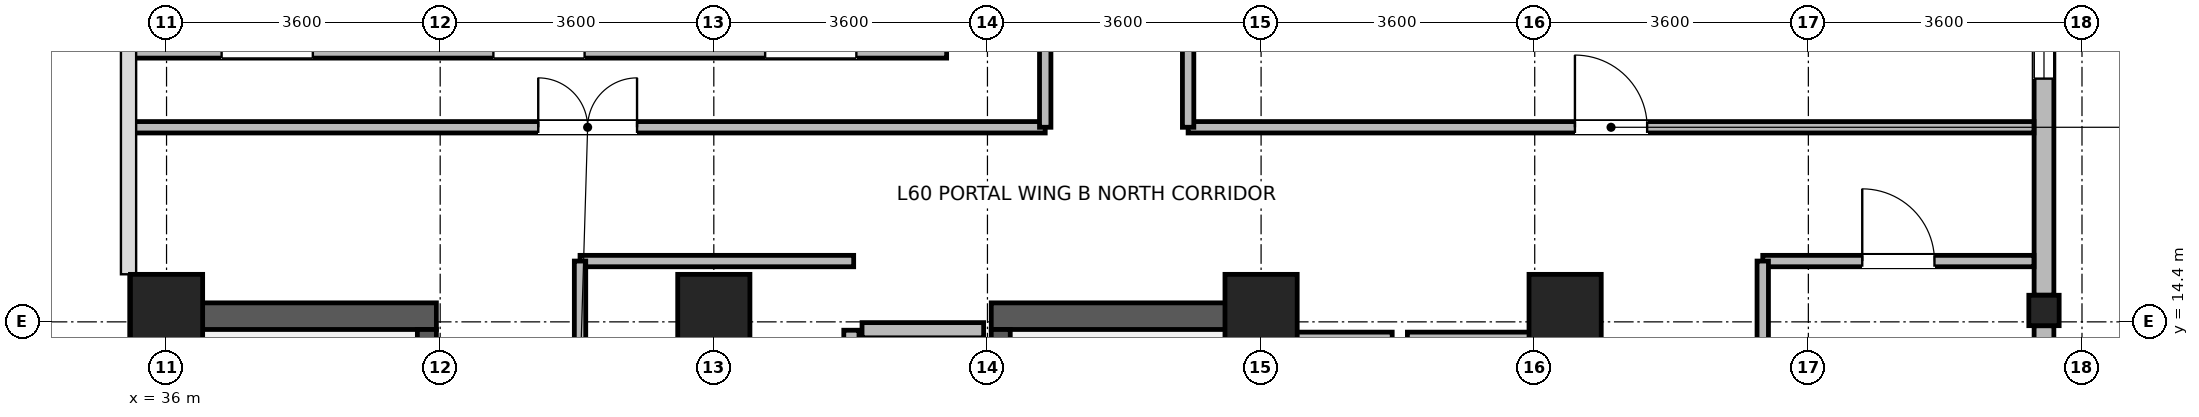
"""IFC4 building model, lengths in metres.
Left out: names, types, materials, properties, quantities, classifications, styles, units other than length and angle.
Written with IfcOpenShell. Run it as: python <this file> out.ifc"""

import sys

from ifc_helpers import new_model, si_unit, direction, frame, frame_2d, origin, origin_2d, place, context, subcontext, project, spatial, rectangle, i_section, extrude, source, transform, mapped, element, fill, save


model = new_model("IFC4")
c1 = context("Model", 3, precision=1e-05, world=origin(), true_north=direction((0.0, 1.0)))
c2 = subcontext(c1, "Body", "Model", "MODEL_VIEW")
j1 = project(units=[si_unit("LENGTHUNIT", "METRE"), si_unit("PLANEANGLEUNIT", "RADIAN")], contexts=[c1])
p1 = place(None, origin())
s1 = spatial("IfcSite", under=j1, at=p1, CompositionType="ELEMENT")
p2 = place(p1, origin())
s2 = spatial("IfcBuilding", under=s1, at=p2, CompositionType="ELEMENT")
p3 = place(p2, frame((0.0, 0.0, 235.1)))
s3 = spatial("IfcBuildingStorey", under=s2, at=p3, CompositionType="ELEMENT", Elevation=235.1)
for number, where, z_axis, x_axis in (
    (1, (36.175, 6.95, 0.0), (0.0, 0.0, 1.0), (0.0, 1.0, 0.0)),
    (2, (50.225, 6.95, 0.0), (0.0, 0.0, 1.0), (0.0, 1.0, 0.0)),
):
    element("IfcWall", number, at=place(p3, frame(where, z_axis=z_axis, x_axis=x_axis)), inside=s3, PredefinedType="SHEAR", context=c2, shape_type="SweptSolid", body=[
        extrude(rectangle(XDim=7.7, YDim=0.35, at=frame_2d((3.85, 0.0))), origin(), (0.0, 0.0, 1.0), 3.44),
    ])
for number, where, z_axis, x_axis in (
    (3, (36.35, 14.475, 0.0), (0.0, 0.0, 1.0), (1.0, 0.0, 0.0)),
    (4, (46.85, 14.475, 0.0), (0.0, 0.0, 1.0), (1.0, 0.0, 0.0)),
):
    element("IfcWall", number, at=place(p3, frame(where, z_axis=z_axis, x_axis=x_axis)), inside=s3, PredefinedType="SHEAR", context=c2, shape_type="SweptSolid", body=[
        extrude(rectangle(XDim=3.2, YDim=0.35, at=frame_2d((1.6, 0.0))), origin(), (0.0, 0.0, 1.0), 3.44),
    ])
p4 = place(p3, frame((39.425, 7.3, 0.0), z_axis=(0.0, 0.0, 1.0), x_axis=(0.0, 1.0, 0.0)))
e5 = element("IfcWall", 5, at=p4, inside=s3, PredefinedType="SHEAR", context=c2, shape_type="SweptSolid", body=[
    extrude(rectangle(XDim=7.0, YDim=0.25, at=frame_2d((3.5, 0.0))), origin(), (0.0, 0.0, 1.0), 3.44),
])
p5 = place(p4, frame((0.15, 0.0, 0.0)))
e6 = element("IfcOpeningElement", 6, at=p5, cuts=e5, PredefinedType="OPENING", context=c2, shape_type="SweptSolid", body=[
    extrude(rectangle(XDim=1.1, YDim=2.08, at=frame_2d((0.55, 1.04))), frame((0.0, 0.135, 0.0), z_axis=(0.0, -1.0, 0.0), x_axis=(1.0, 0.0, 0.0)), (0.0, 0.0, 1.0), 0.27),
])
p6 = place(p3, frame((46.975, 7.3, 0.0), z_axis=(0.0, 0.0, 1.0), x_axis=(0.0, 1.0, 0.0)))
e7 = element("IfcWall", 7, at=p6, inside=s3, PredefinedType="SHEAR", context=c2, shape_type="SweptSolid", body=[
    extrude(rectangle(XDim=7.0, YDim=0.25, at=frame_2d((3.5, 0.0))), origin(), (0.0, 0.0, 1.0), 3.44),
])
p7 = place(p6, frame((0.15, 0.0, 0.0)))
e8 = element("IfcOpeningElement", 8, at=p7, cuts=e7, PredefinedType="OPENING", context=c2, shape_type="SweptSolid", body=[
    extrude(rectangle(XDim=1.1, YDim=2.08, at=frame_2d((0.55, 1.04))), frame((0.0, 0.135, 0.0), z_axis=(0.0, -1.0, 0.0), x_axis=(1.0, 0.0, 0.0)), (0.0, 0.0, 1.0), 0.27),
])
m1 = source(origin(), c2, "Body", "SweptSolid", [
    extrude(rectangle(XDim=0.95, YDim=0.95, at=origin_2d()), origin(), (0.0, 0.0, 1.0), 3.7),
])
for number, where, z_axis, x_axis in (
    (9, (36.0, 14.55, 0.0), (0.0, 0.0, 1.0), (1.0, 0.0, 0.0)),
    (10, (43.2, 14.55, 0.0), (0.0, 0.0, 1.0), (1.0, 0.0, 0.0)),
    (11, (50.4, 14.55, 0.0), (0.0, 0.0, 1.0), (1.0, 0.0, 0.0)),
    (12, (54.4, 14.55, 0.0), (0.0, 0.0, 1.0), (1.0, 0.0, 0.0)),
):
    element("IfcColumn", number, at=place(p3, frame(where, z_axis=z_axis, x_axis=x_axis)), inside=s3, PredefinedType="COLUMN", context=c2, shape_type="MappedRepresentation", body=[
        mapped(m1, transform((0.0, 0.0, 0.0), x_axis=(1.0, 0.0, 0.0), y_axis=(0.0, 1.0, 0.0), z_axis=(0.0, 0.0, 1.0), scale=1.0)),
    ])
m2 = source(origin(), c2, "Body", "SweptSolid", [
    extrude(i_section(OverallWidth=0.399, OverallDepth=0.4, WebThickness=0.017, FlangeThickness=0.023, FilletRadius=0.015, at=origin_2d()), origin(), (0.0, 0.0, 1.0), 3.7),
])
p8 = place(p3, frame((60.7, 14.55, 0.0), z_axis=(0.0, 0.0, 1.0), x_axis=(1.0, 0.0, 0.0)))
e13 = element("IfcColumn", 13, at=p8, inside=s3, PredefinedType="COLUMN", context=c2, shape_type="MappedRepresentation", body=[
    mapped(m2, transform((0.0, 0.0, 0.0), x_axis=(1.0, 0.0, 0.0), y_axis=(0.0, 1.0, 0.0), z_axis=(0.0, 0.0, 1.0), scale=1.0)),
])
p9 = place(p3, frame((60.7, 14.349, 0.0), z_axis=(0.0, 0.0, 1.0), x_axis=(0.0, -1.0, 0.0)))
e14 = element("IfcWall", 14, at=p9, inside=s3, PredefinedType="STANDARD", context=c2, shape_type="SweptSolid", body=[
    extrude(rectangle(XDim=7.098, YDim=0.26, at=frame_2d((3.549, 0.0))), origin(), (0.0, 0.0, 1.0), 3.02),
])
p10 = place(p9, frame((1.175, 0.0, 0.85)))
e15 = element("IfcOpeningElement", 15, at=p10, cuts=e14, PredefinedType="OPENING", context=c2, shape_type="SweptSolid", body=[
    extrude(rectangle(XDim=1.2, YDim=1.75, at=frame_2d((0.6, 0.875))), frame((0.0, 0.14, 0.0), z_axis=(0.0, -1.0, 0.0), x_axis=(1.0, 0.0, 0.0)), (0.0, 0.0, 1.0), 0.28),
])
p11 = place(p9, frame((3.074, 0.0, 0.85)))
e16 = element("IfcOpeningElement", 16, at=p11, cuts=e14, PredefinedType="OPENING", context=c2, shape_type="SweptSolid", body=[
    extrude(rectangle(XDim=0.95, YDim=1.75, at=frame_2d((0.475, 0.875))), frame((0.0, 0.14, 0.0), z_axis=(0.0, -1.0, 0.0), x_axis=(1.0, 0.0, 0.0)), (0.0, 0.0, 1.0), 0.28),
])
p12 = place(p3, frame((60.7, 21.399, 0.0), z_axis=(0.0, 0.0, 1.0), x_axis=(0.0, -1.0, 0.0)))
e17 = element("IfcWall", 17, at=p12, inside=s3, PredefinedType="STANDARD", context=c2, shape_type="SweptSolid", body=[
    extrude(rectangle(XDim=6.648, YDim=0.26, at=frame_2d((3.324, 0.0))), origin(), (0.0, 0.0, 1.0), 3.02),
])
p13 = place(p12, frame((1.062, 0.0, 0.85)))
e18 = element("IfcOpeningElement", 18, at=p13, cuts=e17, PredefinedType="OPENING", context=c2, shape_type="SweptSolid", body=[
    extrude(rectangle(XDim=1.2, YDim=1.75, at=frame_2d((0.6, 0.875))), frame((0.0, 0.14, 0.0), z_axis=(0.0, -1.0, 0.0), x_axis=(1.0, 0.0, 0.0)), (0.0, 0.0, 1.0), 0.28),
])
p14 = place(p12, frame((2.849, 0.0, 0.85)))
e19 = element("IfcOpeningElement", 19, at=p14, cuts=e17, PredefinedType="OPENING", context=c2, shape_type="SweptSolid", body=[
    extrude(rectangle(XDim=0.95, YDim=1.75, at=frame_2d((0.475, 0.875))), frame((0.0, 0.14, 0.0), z_axis=(0.0, -1.0, 0.0), x_axis=(1.0, 0.0, 0.0)), (0.0, 0.0, 1.0), 0.28),
])
p15 = place(p3, frame((35.537, 18.0, 0.0), z_axis=(0.0, 0.0, 1.0), x_axis=(1.0, 0.0, 0.0)))
e20 = element("IfcWall", 20, at=p15, inside=s3, PredefinedType="STANDARD", context=c2, shape_type="SweptSolid", body=[
    extrude(rectangle(XDim=10.726, YDim=0.26, at=frame_2d((5.363, 0.0))), origin(), (0.0, 0.0, 1.0), 3.42),
])
p16 = place(p15, frame((1.188, 0.0, 0.85)))
e21 = element("IfcOpeningElement", 21, at=p16, cuts=e20, PredefinedType="OPENING", context=c2, shape_type="SweptSolid", body=[
    extrude(rectangle(XDim=1.2, YDim=1.75, at=frame_2d((0.6, 0.875))), frame((0.0, 0.14, 0.0), z_axis=(0.0, -1.0, 0.0), x_axis=(1.0, 0.0, 0.0)), (0.0, 0.0, 1.0), 0.28),
])
p17 = place(p15, frame((4.763, 0.0, 0.85)))
e22 = element("IfcOpeningElement", 22, at=p17, cuts=e20, PredefinedType="OPENING", context=c2, shape_type="SweptSolid", body=[
    extrude(rectangle(XDim=1.2, YDim=1.75, at=frame_2d((0.6, 0.875))), frame((0.0, 0.14, 0.0), z_axis=(0.0, -1.0, 0.0), x_axis=(1.0, 0.0, 0.0)), (0.0, 0.0, 1.0), 0.28),
])
p18 = place(p15, frame((8.338, 0.0, 0.85)))
e23 = element("IfcOpeningElement", 23, at=p18, cuts=e20, PredefinedType="OPENING", context=c2, shape_type="SweptSolid", body=[
    extrude(rectangle(XDim=1.2, YDim=1.75, at=frame_2d((0.6, 0.875))), frame((0.0, 0.14, 0.0), z_axis=(0.0, -1.0, 0.0), x_axis=(1.0, 0.0, 0.0)), (0.0, 0.0, 1.0), 0.28),
])
p19 = place(p3, frame((50.475, 14.165, 0.0), z_axis=(0.0, 0.0, 1.0), x_axis=(1.0, 0.0, 0.0)))
e24 = element("IfcWall", 24, at=p19, inside=s3, PredefinedType="PARTITIONING", context=c2, shape_type="SweptSolid", body=[
    extrude(rectangle(XDim=1.65, YDim=0.2, at=frame_2d((0.825, 0.0))), origin(), (0.0, 0.0, 1.0), 3.42),
])
p20 = place(p3, frame((52.325, 14.165, 0.0), z_axis=(0.0, 0.0, 1.0), x_axis=(1.0, 0.0, 0.0)))
e25 = element("IfcWall", 25, at=p20, inside=s3, PredefinedType="PARTITIONING", context=c2, shape_type="SweptSolid", body=[
    extrude(rectangle(XDim=1.65, YDim=0.2, at=frame_2d((0.825, 0.0))), origin(), (0.0, 0.0, 1.0), 3.42),
])
p21 = place(p3, frame((45.15, 14.29, 0.0), z_axis=(0.0, 0.0, 1.0), x_axis=(1.0, 0.0, 0.0)))
e26 = element("IfcWall", 26, at=p21, inside=s3, PredefinedType="PARTITIONING", context=c2, shape_type="SweptSolid", body=[
    extrude(rectangle(XDim=1.6, YDim=0.2, at=frame_2d((0.8, 0.0))), origin(), (0.0, 0.0, 1.0), 2.52),
])
p22 = place(p3, frame((45.01, 11.61, 0.0), z_axis=(0.0, 0.0, 1.0), x_axis=(0.0, 1.0, 0.0)))
e27 = element("IfcWall", 27, at=p22, inside=s3, PredefinedType="PARTITIONING", context=c2, shape_type="SweptSolid", body=[
    extrude(rectangle(XDim=2.68, YDim=0.2, at=frame_2d((1.34, 0.0))), origin(), (0.0, 0.0, 1.0), 3.42),
])
p23 = place(p3, frame((35.52, 16.96, 0.0), z_axis=(0.0, 0.0, 1.0), x_axis=(1.0, 0.0, 0.0)))
e28 = element("IfcWall", 28, at=p23, inside=s3, PredefinedType="PARTITIONING", context=c2, shape_type="SweptSolid", body=[
    extrude(rectangle(XDim=12.04, YDim=0.15, at=frame_2d((6.02, 0.0))), origin(), (0.0, 0.0, 1.0), 3.42),
])
p24 = place(p23, frame((5.37, 0.0, 0.0)))
e29 = element("IfcOpeningElement", 29, at=p24, cuts=e28, PredefinedType="OPENING", context=c2, shape_type="SweptSolid", body=[
    extrude(rectangle(XDim=1.3, YDim=2.12, at=frame_2d((0.65, 1.06))), frame((0.0, 0.085, 0.0), z_axis=(0.0, -1.0, 0.0), x_axis=(1.0, 0.0, 0.0)), (0.0, 0.0, 1.0), 0.17),
])
p25 = place(p3, frame((49.44, 16.96, 0.0), z_axis=(0.0, 0.0, 1.0), x_axis=(1.0, 0.0, 0.0)))
e30 = element("IfcWall", 30, at=p25, inside=s3, PredefinedType="PARTITIONING", context=c2, shape_type="SweptSolid", body=[
    extrude(rectangle(XDim=11.128, YDim=0.15, at=frame_2d((5.564, 0.0))), origin(), (0.0, 0.0, 1.0), 3.42),
])
p26 = place(p25, frame((5.089, 0.0, 0.0)))
e31 = element("IfcOpeningElement", 31, at=p26, cuts=e30, PredefinedType="OPENING", context=c2, shape_type="SweptSolid", body=[
    extrude(rectangle(XDim=0.95, YDim=2.1, at=frame_2d((0.475, 1.05))), frame((0.0, 0.085, 0.0), z_axis=(0.0, -1.0, 0.0), x_axis=(1.0, 0.0, 0.0)), (0.0, 0.0, 1.0), 0.17),
])
p27 = place(p3, frame((49.44, 16.96, 0.0), z_axis=(0.0, 0.0, 1.0), x_axis=(0.0, 1.0, 0.0)))
e32 = element("IfcWall", 32, at=p27, inside=s3, PredefinedType="PARTITIONING", context=c2, shape_type="SweptSolid", body=[
    extrude(rectangle(XDim=5.24, YDim=0.15, at=frame_2d((2.62, 0.0))), origin(), (0.0, 0.0, 1.0), 3.42),
])
p28 = place(p3, frame((47.56, 16.96, 0.0), z_axis=(0.0, 0.0, 1.0), x_axis=(0.0, 1.0, 0.0)))
e33 = element("IfcWall", 33, at=p28, inside=s3, PredefinedType="PARTITIONING", context=c2, shape_type="SweptSolid", body=[
    extrude(rectangle(XDim=4.44, YDim=0.15, at=frame_2d((2.22, 0.0))), origin(), (0.0, 0.0, 1.0), 3.42),
])
p29 = place(p3, frame((57.0, 15.2, 0.0), z_axis=(0.0, 0.0, 1.0), x_axis=(1.0, 0.0, 0.0)))
e34 = element("IfcWall", 34, at=p29, inside=s3, PredefinedType="PARTITIONING", context=c2, shape_type="SweptSolid", body=[
    extrude(rectangle(XDim=3.568, YDim=0.15, at=frame_2d((1.784, 0.0))), origin(), (0.0, 0.0, 1.0), 3.42),
])
p30 = place(p29, frame((1.309, 0.0, 0.0)))
e35 = element("IfcOpeningElement", 35, at=p30, cuts=e34, PredefinedType="OPENING", context=c2, shape_type="SweptSolid", body=[
    extrude(rectangle(XDim=0.95, YDim=2.1, at=frame_2d((0.475, 1.05))), frame((0.0, 0.085, 0.0), z_axis=(0.0, -1.0, 0.0), x_axis=(1.0, 0.0, 0.0)), (0.0, 0.0, 1.0), 0.17),
])
p31 = place(p3, frame((41.44, 15.2, 0.0), z_axis=(0.0, 0.0, 1.0), x_axis=(1.0, 0.0, 0.0)))
e36 = element("IfcWall", 36, at=p31, inside=s3, PredefinedType="PARTITIONING", context=c2, shape_type="SweptSolid", body=[
    extrude(rectangle(XDim=3.6, YDim=0.15, at=frame_2d((1.8, 0.0))), origin(), (0.0, 0.0, 1.0), 3.42),
])
p32 = place(p3, frame((41.44, 11.64, 0.0), z_axis=(0.0, 0.0, 1.0), x_axis=(0.0, 1.0, 0.0)))
e37 = element("IfcWall", 37, at=p32, inside=s3, PredefinedType="PARTITIONING", context=c2, shape_type="SweptSolid", body=[
    extrude(rectangle(XDim=3.56, YDim=0.15, at=frame_2d((1.78, 0.0))), origin(), (0.0, 0.0, 1.0), 3.42),
])
p33 = place(p3, frame((57.0, 11.96, 0.0), z_axis=(0.0, 0.0, 1.0), x_axis=(0.0, 1.0, 0.0)))
e38 = element("IfcWall", 38, at=p33, inside=s3, PredefinedType="PARTITIONING", context=c2, shape_type="SweptSolid", body=[
    extrude(rectangle(XDim=3.24, YDim=0.15, at=frame_2d((1.62, 0.0))), origin(), (0.0, 0.0, 1.0), 3.42),
])
p34 = place(p14, origin())
e39 = element("IfcWindow", 39, at=p34, inside=s3, PartitioningType="SINGLE_PANEL", PredefinedType="WINDOW", context=c2, shape_type="SweptSolid", body=[
    extrude(rectangle(XDim=0.95, YDim=1.75, at=frame_2d((0.475, 0.875))), frame((0.0, 0.03, 0.0), z_axis=(0.0, -1.0, 0.0), x_axis=(1.0, 0.0, 0.0)), (0.0, 0.0, 1.0), 0.06),
])
fill(e19, e39)
p35 = place(p24, origin())
e40 = element("IfcDoor", 40, at=p35, inside=s3, OperationType="DOUBLE_DOOR_SINGLE_SWING", PredefinedType="DOOR", context=c2, shape_type="SweptSolid", body=[
    extrude(rectangle(XDim=1.3, YDim=2.12, at=frame_2d((0.65, 1.06))), frame((0.0, 0.025, 0.0), z_axis=(0.0, -1.0, 0.0), x_axis=(1.0, 0.0, 0.0)), (0.0, 0.0, 1.0), 0.05),
])
fill(e29, e40)
p36 = place(p26, origin())
e41 = element("IfcDoor", 41, at=p36, inside=s3, OperationType="SINGLE_SWING_LEFT", PredefinedType="DOOR", context=c2, shape_type="SweptSolid", body=[
    extrude(rectangle(XDim=0.95, YDim=2.1, at=frame_2d((0.475, 1.05))), frame((0.0, 0.025, 0.0), z_axis=(0.0, -1.0, 0.0), x_axis=(1.0, 0.0, 0.0)), (0.0, 0.0, 1.0), 0.05),
])
fill(e31, e41)
p37 = place(p30, origin())
e42 = element("IfcDoor", 42, at=p37, inside=s3, OperationType="SINGLE_SWING_LEFT", PredefinedType="DOOR", context=c2, shape_type="SweptSolid", body=[
    extrude(rectangle(XDim=0.95, YDim=2.1, at=frame_2d((0.475, 1.05))), frame((0.0, 0.025, 0.0), z_axis=(0.0, -1.0, 0.0), x_axis=(1.0, 0.0, 0.0)), (0.0, 0.0, 1.0), 0.05),
])
fill(e35, e42)
save(model, sys.argv[1])
